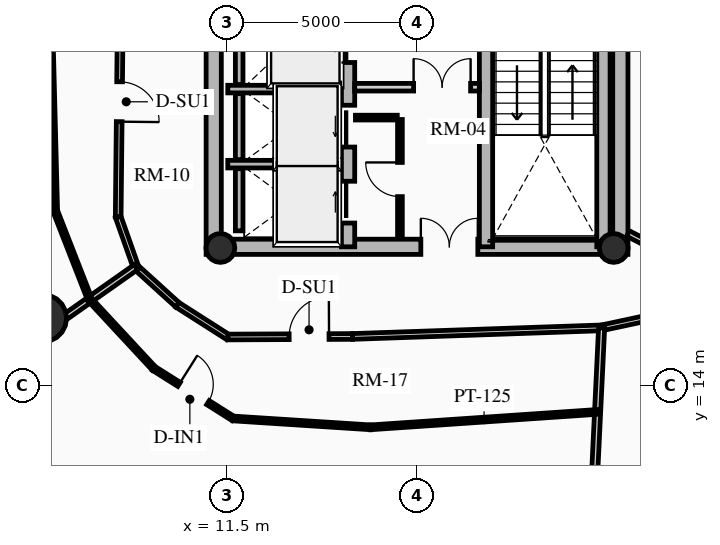
"""IFC4 building model, lengths in metres.
Left out: names, types, materials, properties, quantities, classifications, styles, units other than length and angle.
Written with IfcOpenShell. Run it as: python <this file> out.ifc"""

import sys

from ifc_helpers import new_model, si_unit, direction, frame, frame_2d, origin, origin_2d, place, context, subcontext, project, spatial, rectangle, circle, hollow_circle, extrude, source, transform, mapped, element, fill, save


model = new_model("IFC4")
c1 = context("Model", 3, precision=1e-05, world=origin(), true_north=direction((0.0, 1.0)))
c2 = subcontext(c1, "Body", "Model", "MODEL_VIEW")
j1 = project(units=[si_unit("LENGTHUNIT", "METRE"), si_unit("PLANEANGLEUNIT", "RADIAN")], contexts=[c1])
p1 = place(None, origin())
s1 = spatial("IfcSite", under=j1, at=p1, CompositionType="ELEMENT")
p2 = place(p1, origin())
s2 = spatial("IfcBuilding", under=s1, at=p2, CompositionType="ELEMENT")
p3 = place(p2, frame((0.0, 0.0, 166.15)))
s3 = spatial("IfcBuildingStorey", under=s2, at=p3, CompositionType="ELEMENT", Elevation=166.15)
for number, where, z_axis, x_axis in (
    (1, (11.15, 17.45, 0.0), (0.0, 0.0, 1.0), (0.0, 1.0, 0.0)),
    (2, (21.85, 17.45, 0.0), (0.0, 0.0, 1.0), (0.0, 1.0, 0.0)),
):
    element("IfcWall", number, at=place(p3, frame(where, z_axis=z_axis, x_axis=x_axis)), inside=s3, PredefinedType="SHEAR", context=c2, shape_type="SweptSolid", body=[
        extrude(rectangle(XDim=14.1, YDim=0.4, at=frame_2d((7.05, 0.0))), origin(), (0.0, 0.0, 1.0), 2.91),
    ])
p4 = place(p3, frame((11.15, 17.65, 0.0), z_axis=(0.0, 0.0, 1.0), x_axis=(1.0, 0.0, 0.0)))
e3 = element("IfcWall", 3, at=p4, inside=s3, PredefinedType="SHEAR", context=c2, shape_type="SweptSolid", body=[
    extrude(rectangle(XDim=10.7, YDim=0.4, at=frame_2d((5.35, 0.0))), origin(), (0.0, 0.0, 1.0), 2.91),
])
m1 = source(origin(), c2, "Body", "SweptSolid", [
    extrude(rectangle(XDim=1.5, YDim=2.02, at=frame_2d((0.75, 1.01))), frame((0.0, 0.21, 0.0), z_axis=(0.0, -1.0, 0.0), x_axis=(1.0, 0.0, 0.0)), (0.0, 0.0, 1.0), 0.42),
])
p5 = place(p4, frame((5.45, 0.0, 0.0)))
e4 = element("IfcOpeningElement", 4, at=p5, cuts=e3, PredefinedType="OPENING", context=c2, shape_type="MappedRepresentation", body=[
    mapped(m1, transform((0.0, 0.0, 0.0), x_axis=(1.0, 0.0, 0.0), y_axis=(0.0, 1.0, 0.0), z_axis=(0.0, 0.0, 1.0), scale=1.0)),
])
p6 = place(p3, frame((14.685, 17.65, 0.0), z_axis=(0.0, 0.0, 1.0), x_axis=(0.0, 1.0, 0.0)))
e5 = element("IfcWall", 5, at=p6, inside=s3, PredefinedType="SHEAR", context=c2, shape_type="SweptSolid", body=[
    extrude(rectangle(XDim=13.7, YDim=0.35, at=frame_2d((6.85, 0.0))), origin(), (0.0, 0.0, 1.0), 2.91),
])
m2 = source(origin(), c2, "Body", "SweptSolid", [
    extrude(rectangle(XDim=1.1, YDim=2.015, at=frame_2d((0.55, 1.007))), frame((0.0, 0.185, 0.0), z_axis=(0.0, -1.0, 0.0), x_axis=(1.0, 0.0, 0.0)), (0.0, 0.0, 1.0), 0.37),
])
p7 = place(p6, frame((4.85, 0.0, 0.0)))
e6 = element("IfcOpeningElement", 6, at=p7, cuts=e5, PredefinedType="OPENING", context=c2, shape_type="MappedRepresentation", body=[
    mapped(m2, transform((0.0, 0.0, 0.0), x_axis=(1.0, 0.0, 0.0), y_axis=(0.0, 1.0, 0.0), z_axis=(0.0, 0.0, 1.0), scale=1.0)),
])
p8 = place(p6, frame((0.625, 0.0, 0.0)))
e7 = element("IfcOpeningElement", 7, at=p8, cuts=e5, PredefinedType="OPENING", context=c2, shape_type="MappedRepresentation", body=[
    mapped(m2, transform((0.0, 0.0, 0.0), x_axis=(1.0, 0.0, 0.0), y_axis=(0.0, 1.0, 0.0), z_axis=(0.0, 0.0, 1.0), scale=1.0)),
])
p9 = place(p6, frame((2.625, 0.0, 0.0)))
e8 = element("IfcOpeningElement", 8, at=p9, cuts=e5, PredefinedType="OPENING", context=c2, shape_type="MappedRepresentation", body=[
    mapped(m2, transform((0.0, 0.0, 0.0), x_axis=(1.0, 0.0, 0.0), y_axis=(0.0, 1.0, 0.0), z_axis=(0.0, 0.0, 1.0), scale=1.0)),
])
m3 = source(origin(), c2, "Body", "SweptSolid", [
    extrude(rectangle(XDim=1.15, YDim=2.02, at=frame_2d((0.575, 1.01))), frame((0.0, 0.185, 0.0), z_axis=(0.0, -1.0, 0.0), x_axis=(1.0, 0.0, 0.0)), (0.0, 0.0, 1.0), 0.37),
])
p10 = place(p6, frame((7.27, 0.0, 0.0)))
e9 = element("IfcOpeningElement", 9, at=p10, cuts=e5, PredefinedType="OPENING", context=c2, shape_type="MappedRepresentation", body=[
    mapped(m3, transform((0.0, 0.0, 0.0), x_axis=(1.0, 0.0, 0.0), y_axis=(0.0, 1.0, 0.0), z_axis=(0.0, 0.0, 1.0), scale=1.0)),
])
p11 = place(p3, frame((18.315, 17.65, 0.0), z_axis=(0.0, 0.0, 1.0), x_axis=(0.0, 1.0, 0.0)))
e10 = element("IfcWall", 10, at=p11, inside=s3, PredefinedType="SHEAR", context=c2, shape_type="SweptSolid", body=[
    extrude(rectangle(XDim=9.6, YDim=0.35, at=frame_2d((4.8, 0.0))), origin(), (0.0, 0.0, 1.0), 2.91),
])
p12 = place(p11, frame((5.28, 0.0, 0.0)))
e11 = element("IfcOpeningElement", 11, at=p12, cuts=e10, PredefinedType="OPENING", context=c2, shape_type="MappedRepresentation", body=[
    mapped(m3, transform((0.0, 0.0, 0.0), x_axis=(1.0, 0.0, 0.0), y_axis=(0.0, 1.0, 0.0), z_axis=(0.0, 0.0, 1.0), scale=1.0)),
])
p13 = place(p3, frame((21.405, 17.65, 0.0), z_axis=(0.0, 0.0, 1.0), x_axis=(0.0, 1.0, 0.0)))
e12 = element("IfcWall", 12, at=p13, inside=s3, PredefinedType="SHEAR", context=c2, shape_type="SweptSolid", body=[
    extrude(rectangle(XDim=6.695, YDim=0.35, at=frame_2d((3.348, 0.0))), origin(), (0.0, 0.0, 1.0), 2.91),
])
for number, where, z_axis, x_axis in (
    (13, (11.325, 17.62, 0.0), (0.0, 0.0, 1.0), (1.0, 0.0, 0.0)),
    (14, (21.675, 17.62, 0.0), (0.0, 0.0, 1.0), (1.0, 0.0, 0.0)),
):
    element("IfcColumn", number, at=place(p3, frame(where, z_axis=z_axis, x_axis=x_axis)), inside=s3, PredefinedType="COLUMN", context=c2, shape_type="SweptSolid", body=[
        extrude(hollow_circle(Radius=0.38, WallThickness=0.032, at=origin_2d()), origin(), (0.0, 0.0, 1.0), 2.91),
    ])
p14 = place(p3, frame((6.653, 15.771, 0.0), z_axis=(0.0, 0.0, 1.0), x_axis=(1.0, 0.0, 0.0)))
e15 = element("IfcColumn", 15, at=p14, inside=s3, PredefinedType="USERDEFINED", context=c2, shape_type="SweptSolid", body=[
    extrude(circle(Radius=0.625, at=origin_2d()), origin(), (0.0, 0.0, 1.0), 2.91),
])
p15 = place(p3, frame((7.968, 10.124, 0.0), z_axis=(0.0, 0.0, 1.0), x_axis=(-0.632598524901, 0.774479894053, 0.0)))
e16 = element("IfcWall", 16, at=p15, inside=s3, PredefinedType="SOLIDWALL", context=c2, shape_type="SweptSolid", body=[
    extrude(rectangle(XDim=5.076, YDim=0.22, at=frame_2d((2.538, 0.0))), origin(), (0.0, 0.0, 1.0), 2.675),
])
p16 = place(p3, frame((11.52, 21.8, 0.0), z_axis=(0.0, 0.0, 1.0), x_axis=(1.0, 0.0, 0.0)))
e17 = element("IfcWall", 17, at=p16, inside=s3, PredefinedType="SHEAR", context=c2, shape_type="SweptSolid", body=[
    extrude(rectangle(XDim=2.97, YDim=0.2, at=frame_2d((1.485, 0.0))), origin(), (0.0, 0.0, 1.0), 2.91),
])
p17 = place(p3, frame((11.82, 21.92, 0.0), z_axis=(0.0, 0.0, 1.0), x_axis=(0.0, 1.0, 0.0)))
e18 = element("IfcWall", 18, at=p17, inside=s3, PredefinedType="SHEAR", context=c2, shape_type="SweptSolid", body=[
    extrude(rectangle(XDim=2.44, YDim=0.2, at=frame_2d((1.22, 0.0))), origin(), (0.0, 0.0, 1.0), 2.91),
])
p18 = place(p3, frame((11.52, 19.825, 0.0), z_axis=(0.0, 0.0, 1.0), x_axis=(1.0, 0.0, 0.0)))
e19 = element("IfcWall", 19, at=p18, inside=s3, PredefinedType="SHEAR", context=c2, shape_type="SweptSolid", body=[
    extrude(rectangle(XDim=2.97, YDim=0.2, at=frame_2d((1.485, 0.0))), origin(), (0.0, 0.0, 1.0), 2.91),
])
p19 = place(p3, frame((11.82, 19.945, 0.0), z_axis=(0.0, 0.0, 1.0), x_axis=(0.0, 1.0, 0.0)))
e20 = element("IfcWall", 20, at=p19, inside=s3, PredefinedType="SHEAR", context=c2, shape_type="SweptSolid", body=[
    extrude(rectangle(XDim=1.735, YDim=0.2, at=frame_2d((0.867, 0.0))), origin(), (0.0, 0.0, 1.0), 2.91),
])
p20 = place(p3, frame((11.82, 18.07, 0.0), z_axis=(0.0, 0.0, 1.0), x_axis=(0.0, 1.0, 0.0)))
e21 = element("IfcWall", 21, at=p20, inside=s3, PredefinedType="SHEAR", context=c2, shape_type="SweptSolid", body=[
    extrude(rectangle(XDim=1.635, YDim=0.2, at=frame_2d((0.817, 0.0))), origin(), (0.0, 0.0, 1.0), 2.91),
])
p21 = place(p3, frame((14.86, 21.85, 0.0), z_axis=(0.0, 0.0, 1.0), x_axis=(1.0, 0.0, 0.0)))
e22 = element("IfcWall", 22, at=p21, inside=s3, PredefinedType="PARTITIONING", context=c2, shape_type="SweptSolid", body=[
    extrude(rectangle(XDim=3.28, YDim=0.2, at=frame_2d((1.64, 0.0))), origin(), (0.0, 0.0, 1.0), 2.675),
])
m4 = source(origin(), c2, "Body", "SweptSolid", [
    extrude(rectangle(XDim=1.5, YDim=2.02, at=frame_2d((0.75, 1.01))), frame((0.0, 0.11, 0.0), z_axis=(0.0, -1.0, 0.0), x_axis=(1.0, 0.0, 0.0)), (0.0, 0.0, 1.0), 0.22),
])
p22 = place(p21, frame((1.55, 0.0, 0.0)))
e23 = element("IfcOpeningElement", 23, at=p22, cuts=e22, PredefinedType="OPENING", context=c2, shape_type="MappedRepresentation", body=[
    mapped(m4, transform((0.0, 0.0, 0.0), x_axis=(1.0, 0.0, 0.0), y_axis=(0.0, 1.0, 0.0), z_axis=(0.0, 0.0, 1.0), scale=1.0)),
])
p23 = place(p3, frame((16.05, 17.92, 0.0), z_axis=(0.0, 0.0, 1.0), x_axis=(0.0, 1.0, 0.0)))
e24 = element("IfcWall", 24, at=p23, inside=s3, PredefinedType="PARTITIONING", context=c2, shape_type="SweptSolid", body=[
    extrude(rectangle(XDim=3.08, YDim=0.125, at=frame_2d((1.54, 0.0))), origin(), (0.0, 0.0, 1.0), 2.675),
])
m5 = source(origin(), c2, "Body", "SweptSolid", [
    extrude(rectangle(XDim=0.9, YDim=2.005, at=frame_2d((0.45, 1.002))), frame((0.0, 0.073, 0.0), z_axis=(0.0, -1.0, 0.0), x_axis=(1.0, 0.0, 0.0)), (0.0, 0.0, 1.0), 0.145),
])
p24 = place(p23, frame((1.05, 0.0, 0.0)))
e25 = element("IfcOpeningElement", 25, at=p24, cuts=e24, PredefinedType="OPENING", context=c2, shape_type="MappedRepresentation", body=[
    mapped(m5, transform((0.0, 0.0, 0.0), x_axis=(1.0, 0.0, 0.0), y_axis=(0.0, 1.0, 0.0), z_axis=(0.0, 0.0, 1.0), scale=1.0)),
])
p25 = place(p3, frame((14.88, 21.05, 0.0), z_axis=(0.0, 0.0, 1.0), x_axis=(1.0, 0.0, 0.0)))
e26 = element("IfcWall", 26, at=p25, inside=s3, PredefinedType="PARTITIONING", context=c2, shape_type="SweptSolid", body=[
    extrude(rectangle(XDim=1.1, YDim=0.125, at=frame_2d((0.55, 0.0))), origin(), (0.0, 0.0, 1.0), 2.675),
])
p26 = place(p3, frame((8.7, 24.5, 0.0), z_axis=(0.0, 0.0, 1.0), x_axis=(-0.010507512335, -0.999944794568, 0.0)))
e27 = element("IfcWall", 27, at=p26, inside=s3, PredefinedType="PARTITIONING", context=c2, shape_type="SweptSolid", body=[
    extrude(rectangle(XDim=6.064, YDim=0.15, at=frame_2d((3.032, 0.0))), origin(), (0.0, 0.0, 1.0), 2.245),
])
m6 = source(origin(), c2, "Body", "SweptSolid", [
    extrude(rectangle(XDim=1.05, YDim=2.015, at=frame_2d((0.525, 1.007))), frame((0.0, 0.085, 0.0), z_axis=(0.0, -1.0, 0.0), x_axis=(1.0, 0.0, 0.0)), (0.0, 0.0, 1.0), 0.17),
])
p27 = place(p26, frame((2.507, 0.0, 0.0)))
e28 = element("IfcOpeningElement", 28, at=p27, cuts=e27, PredefinedType="OPENING", context=c2, shape_type="MappedRepresentation", body=[
    mapped(m6, transform((0.0, 0.0, 0.0), x_axis=(1.0, 0.0, 0.0), y_axis=(0.0, 1.0, 0.0), z_axis=(0.0, 0.0, 1.0), scale=1.0)),
])
p28 = place(p3, frame((8.636, 18.436, 0.0), z_axis=(0.0, 0.0, 1.0), x_axis=(0.333211866524, -0.942851977782, 0.0)))
e29 = element("IfcWall", 29, at=p28, inside=s3, PredefinedType="PARTITIONING", context=c2, shape_type="SweptSolid", body=[
    extrude(rectangle(XDim=1.402, YDim=0.15, at=frame_2d((0.701, 0.0))), origin(), (0.0, 0.0, 1.0), 2.245),
])
p29 = place(p3, frame((9.103, 17.115, 0.0), z_axis=(0.0, 0.0, 1.0), x_axis=(0.740186897911, -0.672401186912, 0.0)))
e30 = element("IfcWall", 30, at=p29, inside=s3, PredefinedType="PARTITIONING", context=c2, shape_type="SweptSolid", body=[
    extrude(rectangle(XDim=1.477, YDim=0.15, at=frame_2d((0.738, 0.0))), origin(), (0.0, 0.0, 1.0), 2.245),
])
p30 = place(p3, frame((10.196, 16.122, 0.0), z_axis=(0.0, 0.0, 1.0), x_axis=(0.843021142441, -0.537880426673, 0.0)))
e31 = element("IfcWall", 31, at=p30, inside=s3, PredefinedType="PARTITIONING", context=c2, shape_type="SweptSolid", body=[
    extrude(rectangle(XDim=1.571, YDim=0.15, at=frame_2d((0.786, 0.0))), origin(), (0.0, 0.0, 1.0), 2.245),
])
p31 = place(p3, frame((11.521, 15.276, 0.0), z_axis=(0.0, 0.0, 1.0), x_axis=(0.999990688463, 0.004315436007, 0.0)))
e32 = element("IfcWall", 32, at=p31, inside=s3, PredefinedType="PARTITIONING", context=c2, shape_type="SweptSolid", body=[
    extrude(rectangle(XDim=3.281, YDim=0.15, at=frame_2d((1.641, 0.0))), origin(), (0.0, 0.0, 1.0), 2.245),
])
p32 = place(p31, frame((1.613, 0.0, 0.0)))
e33 = element("IfcOpeningElement", 33, at=p32, cuts=e32, PredefinedType="OPENING", context=c2, shape_type="MappedRepresentation", body=[
    mapped(m6, transform((0.0, 0.0, 0.0), x_axis=(1.0, 0.0, 0.0), y_axis=(0.0, 1.0, 0.0), z_axis=(0.0, 0.0, 1.0), scale=1.0)),
])
p33 = place(p3, frame((14.802, 15.291, 0.0), z_axis=(0.0, 0.0, 1.0), x_axis=(0.999405778293, 0.034468686011, 0.0)))
e34 = element("IfcWall", 34, at=p33, inside=s3, PredefinedType="PARTITIONING", context=c2, shape_type="SweptSolid", body=[
    extrude(rectangle(XDim=6.559, YDim=0.15, at=frame_2d((3.279, 0.0))), origin(), (0.0, 0.0, 1.0), 2.245),
])
p34 = place(p3, frame((21.357, 15.517, 0.0), z_axis=(0.0, 0.0, 1.0), x_axis=(0.977773676035, 0.209663154733, 0.0)))
e35 = element("IfcWall", 35, at=p34, inside=s3, PredefinedType="PARTITIONING", context=c2, shape_type="SweptSolid", body=[
    extrude(rectangle(XDim=1.865, YDim=0.15, at=frame_2d((0.933, 0.0))), origin(), (0.0, 0.0, 1.0), 2.245),
])
p35 = place(p3, frame((9.103, 17.115, 0.0), z_axis=(0.0, 0.0, 1.0), x_axis=(-0.817760605426, -0.575558504597, 0.0)))
e36 = element("IfcWall", 36, at=p35, inside=s3, PredefinedType="PARTITIONING", context=c2, shape_type="SweptSolid", body=[
    extrude(rectangle(XDim=5.295, YDim=0.16, at=frame_2d((2.647, 0.0))), origin(), (0.0, 0.0, 1.0), 2.245),
])
p36 = place(p3, frame((21.357, 15.517, 0.0), z_axis=(0.0, 0.0, 1.0), x_axis=(-0.047796931987, -0.998857073506, 0.0)))
e37 = element("IfcWall", 37, at=p36, inside=s3, PredefinedType="PARTITIONING", context=c2, shape_type="SweptSolid", body=[
    extrude(rectangle(XDim=7.907, YDim=0.16, at=frame_2d((3.954, 0.0))), origin(), (0.0, 0.0, 1.0), 2.245),
])
p37 = place(p3, frame((22.05, 18.0, 0.0), z_axis=(0.0, 0.0, 1.0), x_axis=(0.890660222535, -0.454669515136, 0.0)))
e38 = element("IfcWall", 38, at=p37, inside=s3, PredefinedType="PARTITIONING", context=c2, shape_type="SweptSolid", body=[
    extrude(rectangle(XDim=2.144, YDim=0.16, at=frame_2d((1.072, 0.0))), origin(), (0.0, 0.0, 1.0), 2.245),
])
m7 = source(origin(), c2, "Body", "SweptSolid", [
    extrude(rectangle(XDim=1.05, YDim=2.015, at=frame_2d((0.525, 1.007))), frame((0.0, 0.09, 0.0), z_axis=(0.0, -1.0, 0.0), x_axis=(1.0, 0.0, 0.0)), (0.0, 0.0, 1.0), 0.18),
])
p38 = place(p37, frame((0.894, 0.0, 0.0)))
e39 = element("IfcOpeningElement", 39, at=p38, cuts=e38, PredefinedType="OPENING", context=c2, shape_type="MappedRepresentation", body=[
    mapped(m7, transform((0.0, 0.0, 0.0), x_axis=(1.0, 0.0, 0.0), y_axis=(0.0, 1.0, 0.0), z_axis=(0.0, 0.0, 1.0), scale=1.0)),
])
p39 = place(p3, frame((6.825, 24.5, 0.0), z_axis=(0.0, 0.0, 1.0), x_axis=(0.025845586866, -0.999665947024, 0.0)))
e40 = element("IfcWall", 40, at=p39, inside=s3, PredefinedType="PARTITIONING", context=c2, shape_type="SweptSolid", body=[
    extrude(rectangle(XDim=5.904, YDim=0.125, at=frame_2d((2.952, 0.0))), origin(), (0.0, 0.0, 1.0), 2.245),
])
p40 = place(p3, frame((6.978, 18.598, 0.0), z_axis=(0.0, 0.0, 1.0), x_axis=(0.363845250376, -0.931459410698, 0.0)))
e41 = element("IfcWall", 41, at=p40, inside=s3, PredefinedType="PARTITIONING", context=c2, shape_type="SweptSolid", body=[
    extrude(rectangle(XDim=2.509, YDim=0.125, at=frame_2d((1.254, 0.0))), origin(), (0.0, 0.0, 1.0), 2.245),
])
p41 = place(p3, frame((7.891, 16.261, 0.0), z_axis=(0.0, 0.0, 1.0), x_axis=(0.680443535441, -0.7328005152, 0.0)))
e42 = element("IfcWall", 42, at=p41, inside=s3, PredefinedType="PARTITIONING", context=c2, shape_type="SweptSolid", body=[
    extrude(rectangle(XDim=2.476, YDim=0.125, at=frame_2d((1.238, 0.0))), origin(), (0.0, 0.0, 1.0), 2.245),
])
p42 = place(p3, frame((9.576, 14.447, 0.0), z_axis=(0.0, 0.0, 1.0), x_axis=(0.845905204383, -0.53333327779, 0.0)))
e43 = element("IfcWall", 43, at=p42, inside=s3, PredefinedType="PARTITIONING", context=c2, shape_type="SweptSolid", body=[
    extrude(rectangle(XDim=2.465, YDim=0.125, at=frame_2d((1.232, 0.0))), origin(), (0.0, 0.0, 1.0), 2.245),
])
p43 = place(p42, frame((0.782, 0.0, 0.0)))
e44 = element("IfcOpeningElement", 44, at=p43, cuts=e43, PredefinedType="OPENING", context=c2, shape_type="MappedRepresentation", body=[
    mapped(m5, transform((0.0, 0.0, 0.0), x_axis=(1.0, 0.0, 0.0), y_axis=(0.0, 1.0, 0.0), z_axis=(0.0, 0.0, 1.0), scale=1.0)),
])
p44 = place(p3, frame((11.661, 13.132, 0.0), z_axis=(0.0, 0.0, 1.0), x_axis=(0.997932841329, -0.064265419915, 0.0)))
e45 = element("IfcWall", 45, at=p44, inside=s3, PredefinedType="PARTITIONING", context=c2, shape_type="SweptSolid", body=[
    extrude(rectangle(XDim=3.624, YDim=0.125, at=frame_2d((1.812, 0.0))), origin(), (0.0, 0.0, 1.0), 2.245),
])
p45 = place(p3, frame((15.278, 12.899, 0.0), z_axis=(0.0, 0.0, 1.0), x_axis=(0.997695501463, 0.067850470592, 0.0)))
e46 = element("IfcWall", 46, at=p45, inside=s3, PredefinedType="PARTITIONING", context=c2, shape_type="SweptSolid", body=[
    extrude(rectangle(XDim=5.988, YDim=0.125, at=frame_2d((2.994, 0.0))), origin(), (0.0, 0.0, 1.0), 2.245),
])
m8 = source(origin(), c2, "Body", "SweptSolid", [
    extrude(rectangle(XDim=1.1, YDim=2.015, at=frame_2d((0.55, 1.007))), frame((0.0, 0.025, 0.0), z_axis=(0.0, -1.0, 0.0), x_axis=(1.0, 0.0, 0.0)), (0.0, 0.0, 1.0), 0.05),
])
p46 = place(p7, origin())
e47 = element("IfcDoor", 47, at=p46, inside=s3, OperationType="SLIDING_TO_LEFT", PredefinedType="DOOR", context=c2, shape_type="MappedRepresentation", body=[
    mapped(m8, transform((0.0, 0.0, 0.0), x_axis=(1.0, 0.0, 0.0), y_axis=(0.0, 1.0, 0.0), z_axis=(0.0, 0.0, 1.0), scale=1.0)),
])
fill(e6, e47)
p47 = place(p8, origin())
e48 = element("IfcDoor", 48, at=p47, inside=s3, OperationType="SLIDING_TO_RIGHT", PredefinedType="DOOR", context=c2, shape_type="MappedRepresentation", body=[
    mapped(m8, transform((0.0, 0.0, 0.0), x_axis=(1.0, 0.0, 0.0), y_axis=(0.0, 1.0, 0.0), z_axis=(0.0, 0.0, 1.0), scale=1.0)),
])
fill(e7, e48)
p48 = place(p9, origin())
e49 = element("IfcDoor", 49, at=p48, inside=s3, OperationType="SLIDING_TO_LEFT", PredefinedType="DOOR", context=c2, shape_type="MappedRepresentation", body=[
    mapped(m8, transform((0.0, 0.0, 0.0), x_axis=(1.0, 0.0, 0.0), y_axis=(0.0, 1.0, 0.0), z_axis=(0.0, 0.0, 1.0), scale=1.0)),
])
fill(e8, e49)
m9 = source(origin(), c2, "Body", "SweptSolid", [
    extrude(rectangle(XDim=1.5, YDim=2.02, at=frame_2d((0.75, 1.01))), frame((0.0, 0.025, 0.0), z_axis=(0.0, -1.0, 0.0), x_axis=(1.0, 0.0, 0.0)), (0.0, 0.0, 1.0), 0.05),
])
p49 = place(p5, origin())
e50 = element("IfcDoor", 50, at=p49, inside=s3, OperationType="DOUBLE_DOOR_SINGLE_SWING", PredefinedType="DOOR", context=c2, shape_type="MappedRepresentation", body=[
    mapped(m9, transform((0.0, 0.0, 0.0), x_axis=(1.0, 0.0, 0.0), y_axis=(0.0, 1.0, 0.0), z_axis=(0.0, 0.0, 1.0), scale=1.0)),
])
fill(e4, e50)
p50 = place(p22, origin())
e51 = element("IfcDoor", 51, at=p50, inside=s3, OperationType="DOUBLE_DOOR_SINGLE_SWING", PredefinedType="DOOR", context=c2, shape_type="MappedRepresentation", body=[
    mapped(m9, transform((0.0, 0.0, 0.0), x_axis=(1.0, 0.0, 0.0), y_axis=(0.0, 1.0, 0.0), z_axis=(0.0, 0.0, 1.0), scale=1.0)),
])
fill(e23, e51)
m10 = source(origin(), c2, "Body", "SweptSolid", [
    extrude(rectangle(XDim=0.9, YDim=2.005, at=frame_2d((0.45, 1.002))), frame((0.0, 0.025, 0.0), z_axis=(0.0, -1.0, 0.0), x_axis=(1.0, 0.0, 0.0)), (0.0, 0.0, 1.0), 0.05),
])
p51 = place(p24, origin())
e52 = element("IfcDoor", 52, at=p51, inside=s3, OperationType="SINGLE_SWING_RIGHT", PredefinedType="DOOR", context=c2, shape_type="MappedRepresentation", body=[
    mapped(m10, transform((0.0, 0.0, 0.0), x_axis=(1.0, 0.0, 0.0), y_axis=(0.0, 1.0, 0.0), z_axis=(0.0, 0.0, 1.0), scale=1.0)),
])
fill(e25, e52)
m11 = source(origin(), c2, "Body", "SweptSolid", [
    extrude(rectangle(XDim=1.05, YDim=2.015, at=frame_2d((0.525, 1.007))), frame((0.0, 0.025, 0.0), z_axis=(0.0, -1.0, 0.0), x_axis=(1.0, 0.0, 0.0)), (0.0, 0.0, 1.0), 0.05),
])
p52 = place(p27, origin())
e53 = element("IfcDoor", 53, at=p52, inside=s3, OperationType="SINGLE_SWING_RIGHT", PredefinedType="DOOR", context=c2, shape_type="MappedRepresentation", body=[
    mapped(m11, transform((0.0, 0.0, 0.0), x_axis=(1.0, 0.0, 0.0), y_axis=(0.0, 1.0, 0.0), z_axis=(0.0, 0.0, 1.0), scale=1.0)),
])
fill(e28, e53)
p53 = place(p32, origin())
e54 = element("IfcDoor", 54, at=p53, inside=s3, OperationType="SINGLE_SWING_RIGHT", PredefinedType="DOOR", context=c2, shape_type="MappedRepresentation", body=[
    mapped(m11, transform((0.0, 0.0, 0.0), x_axis=(1.0, 0.0, 0.0), y_axis=(0.0, 1.0, 0.0), z_axis=(0.0, 0.0, 1.0), scale=1.0)),
])
fill(e33, e54)
p54 = place(p43, origin())
e55 = element("IfcDoor", 55, at=p54, inside=s3, OperationType="SINGLE_SWING_LEFT", PredefinedType="DOOR", context=c2, shape_type="MappedRepresentation", body=[
    mapped(m10, transform((0.0, 0.0, 0.0), x_axis=(1.0, 0.0, 0.0), y_axis=(0.0, 1.0, 0.0), z_axis=(0.0, 0.0, 1.0), scale=1.0)),
])
fill(e44, e55)
save(model, sys.argv[1])
